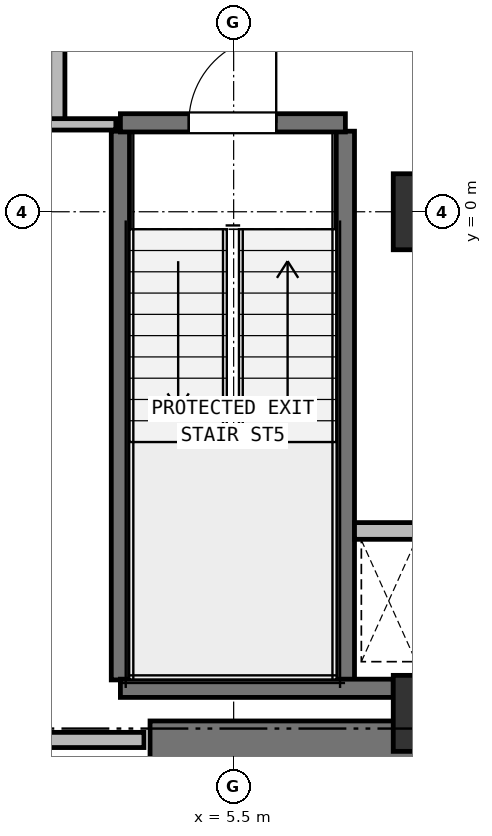
"""IFC4 building model, lengths in metres.
Left out: names, types, materials, properties, quantities, classifications, styles, units other than length and angle.
Written with IfcOpenShell. Run it as: python <this file> out.ifc"""

import sys

from ifc_helpers import new_model, si_unit, direction, frame, frame_2d, origin, origin_2d, place, context, subcontext, project, spatial, rectangle, extrude, element, fill, save


model = new_model("IFC4")
c1 = context("Model", 3, precision=1e-05, world=origin(), true_north=direction((0.0, 1.0)))
c2 = subcontext(c1, "Body", "Model", "MODEL_VIEW")
j1 = project(units=[si_unit("LENGTHUNIT", "METRE"), si_unit("PLANEANGLEUNIT", "RADIAN")], contexts=[c1])
p1 = place(None, origin())
s1 = spatial("IfcSite", under=j1, at=p1, CompositionType="ELEMENT")
p2 = place(p1, origin())
s2 = spatial("IfcBuilding", under=s1, at=p2, CompositionType="ELEMENT")
p3 = place(p2, frame((0.0, 0.0, 194.15)))
s3 = spatial("IfcBuildingStorey", under=s2, at=p3, CompositionType="ELEMENT", Elevation=194.15)
for number, where, z_axis, x_axis in (
    (1, (8.0, -6.6, 0.0), (0.0, 0.0, 1.0), (1.0, 0.0, 0.0)),
    (2, (8.0, 0.0, 0.0), (0.0, 0.0, 1.0), (1.0, 0.0, 0.0)),
):
    element("IfcColumn", number, at=place(p3, frame(where, z_axis=z_axis, x_axis=x_axis)), inside=s3, PredefinedType="COLUMN", context=c2, shape_type="SweptSolid", body=[
        extrude(rectangle(XDim=0.8, YDim=1.0, at=origin_2d()), origin(), (0.0, 0.0, 1.0), 3.8),
    ])
p4 = place(p3, frame((4.4, -6.95, 0.0), z_axis=(0.0, 0.0, 1.0), x_axis=(1.0, 0.0, 0.0)))
e3 = element("IfcWall", 3, at=p4, inside=s3, PredefinedType="SHEAR", context=c2, shape_type="SweptSolid", body=[
    extrude(rectangle(XDim=3.95, YDim=0.5, at=frame_2d((1.975, 0.0))), origin(), (0.0, 0.0, 1.0), 3.55),
])
for number, where, z_axis, x_axis in (
    (4, (4.01, -6.16, 0.0), (0.0, 0.0, 1.0), (0.0, 1.0, 0.0)),
    (5, (6.97, -6.16, 0.0), (0.0, 0.0, 1.0), (0.0, 1.0, 0.0)),
):
    element("IfcWall", number, at=place(p3, frame(where, z_axis=z_axis, x_axis=x_axis)), inside=s3, PredefinedType="SHEAR", context=c2, shape_type="SweptSolid", body=[
        extrude(rectangle(XDim=7.22, YDim=0.24, at=frame_2d((3.61, 0.0))), origin(), (0.0, 0.0, 1.0), 3.55),
    ])
p5 = place(p3, frame((4.01, -6.27, 0.0), z_axis=(0.0, 0.0, 1.0), x_axis=(1.0, 0.0, 0.0)))
e6 = element("IfcWall", 6, at=p5, inside=s3, PredefinedType="SHEAR", context=c2, shape_type="SweptSolid", body=[
    extrude(rectangle(XDim=3.59, YDim=0.24, at=frame_2d((1.795, 0.0))), origin(), (0.0, 0.0, 1.0), 3.55),
])
p6 = place(p3, frame((4.01, 1.17, 0.0), z_axis=(0.0, 0.0, 1.0), x_axis=(1.0, 0.0, 0.0)))
e7 = element("IfcWall", 7, at=p6, inside=s3, PredefinedType="SHEAR", context=c2, shape_type="SweptSolid", body=[
    extrude(rectangle(XDim=2.96, YDim=0.24, at=frame_2d((1.48, 0.0))), origin(), (0.0, 0.0, 1.0), 3.55),
])
p7 = place(p6, frame((0.9, 0.0, 0.0)))
e8 = element("IfcOpeningElement", 8, at=p7, cuts=e7, PredefinedType="OPENING", context=c2, shape_type="SweptSolid", body=[
    extrude(rectangle(XDim=1.15, YDim=2.15, at=frame_2d((0.575, 1.075))), frame((0.0, 0.13, 0.0), z_axis=(0.0, -1.0, 0.0), x_axis=(1.0, 0.0, 0.0)), (0.0, 0.0, 1.0), 0.26),
])
p8 = place(p3, frame((7.09, -4.2, 0.0), z_axis=(0.0, 0.0, 1.0), x_axis=(1.0, 0.0, 0.0)))
e9 = element("IfcWall", 9, at=p8, inside=s3, PredefinedType="PARTITIONING", context=c2, shape_type="SweptSolid", body=[
    extrude(rectangle(XDim=1.01, YDim=0.22, at=frame_2d((0.505, 0.0))), origin(), (0.0, 0.0, 1.0), 3.55),
])
p9 = place(p3, frame((3.18, 1.15, 0.0), z_axis=(0.0, 0.0, 1.0), x_axis=(0.0, 1.0, 0.0)))
e10 = element("IfcWall", 10, at=p9, inside=s3, PredefinedType="PARTITIONING", context=c2, shape_type="SweptSolid", body=[
    extrude(rectangle(XDim=3.3, YDim=0.2, at=frame_2d((1.65, 0.0))), origin(), (0.0, 0.0, 1.0), 3.55),
])
p10 = place(p9, frame((1.08, 0.0, 0.0)))
e11 = element("IfcOpeningElement", 11, at=p10, cuts=e10, PredefinedType="OPENING", context=c2, shape_type="SweptSolid", body=[
    extrude(rectangle(XDim=1.15, YDim=2.15, at=frame_2d((0.575, 1.075))), frame((0.0, 0.11, 0.0), z_axis=(0.0, -1.0, 0.0), x_axis=(1.0, 0.0, 0.0)), (0.0, 0.0, 1.0), 0.22),
])
p11 = place(p3, frame((3.95, 1.15, 0.0), z_axis=(0.0, 0.0, 1.0), x_axis=(-1.0, 0.0, 0.0)))
e12 = element("IfcWall", 12, at=p11, inside=s3, PredefinedType="PARTITIONING", context=c2, shape_type="SweptSolid", body=[
    extrude(rectangle(XDim=7.9, YDim=0.15, at=frame_2d((3.95, 0.0))), origin(), (0.0, 0.0, 1.0), 3.55),
])
p12 = place(p11, frame((3.49, 0.0, 0.0)))
e13 = element("IfcOpeningElement", 13, at=p12, cuts=e12, PredefinedType="OPENING", context=c2, shape_type="SweptSolid", body=[
    extrude(rectangle(XDim=0.92, YDim=2.05, at=frame_2d((0.46, 1.025))), frame((0.0, 0.085, 0.0), z_axis=(0.0, -1.0, 0.0), x_axis=(1.0, 0.0, 0.0)), (0.0, 0.0, 1.0), 0.17),
])
p13 = place(p3, frame((-4.32, -6.95, 0.0), z_axis=(0.0, 0.0, 1.0), x_axis=(1.0, 0.0, 0.0)))
e14 = element("IfcWall", 14, at=p13, inside=s3, PredefinedType="PARTITIONING", context=c2, shape_type="SweptSolid", body=[
    extrude(rectangle(XDim=8.64, YDim=0.2, at=frame_2d((4.32, 0.0))), origin(), (0.0, 0.0, 1.0), 3.55),
])
p14 = place(p7, origin())
e15 = element("IfcDoor", 15, at=p14, inside=s3, OperationType="SINGLE_SWING_RIGHT", PredefinedType="DOOR", context=c2, shape_type="SweptSolid", body=[
    extrude(rectangle(XDim=1.15, YDim=2.15, at=frame_2d((0.575, 1.075))), frame((0.0, 0.025, 0.0), z_axis=(0.0, -1.0, 0.0), x_axis=(1.0, 0.0, 0.0)), (0.0, 0.0, 1.0), 0.05),
])
fill(e8, e15)
save(model, sys.argv[1])
